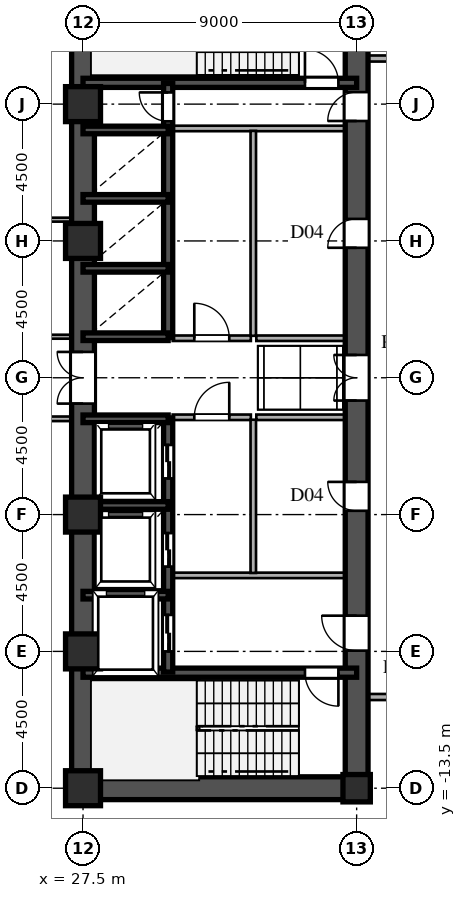
"""IFC4 building model, lengths in metres.
Left out: names, types, materials, properties, quantities, classifications, styles, units other than length and angle.
Written with IfcOpenShell. Run it as: python <this file> out.ifc"""

import sys

from ifc_helpers import new_model, si_unit, direction, frame, frame_2d, origin, origin_2d, place, context, subcontext, project, spatial, rectangle, hollow_rectangle, i_section, extrude, source, transform, mapped, element, fill, save


model = new_model("IFC4")
c1 = context("Model", 3, precision=1e-05, world=origin(), true_north=direction((0.0, 1.0)))
c2 = subcontext(c1, "Body", "Model", "MODEL_VIEW")
j1 = project(units=[si_unit("LENGTHUNIT", "METRE"), si_unit("PLANEANGLEUNIT", "RADIAN")], contexts=[c1])
p1 = place(None, origin())
s1 = spatial("IfcSite", under=j1, at=p1, CompositionType="ELEMENT")
p2 = place(p1, origin())
s2 = spatial("IfcBuilding", under=s1, at=p2, CompositionType="ELEMENT")
p3 = place(p2, frame((0.0, 0.0, 5.4)))
s3 = spatial("IfcBuildingStorey", under=s2, at=p3, CompositionType="ELEMENT", Elevation=5.4)
m1 = source(origin(), c2, "Body", "SweptSolid", [
    extrude(hollow_rectangle(XDim=1.15, YDim=1.15, WallThickness=0.048, at=origin_2d()), origin(), (0.0, 0.0, 1.0), 4.5),
])
for number, where, z_axis, x_axis in (
    (1, (27.5, -13.5, 0.0), (0.0, 0.0, 1.0), (1.0, 0.0, 0.0)),
    (2, (27.5, -9.0, 0.0), (0.0, 0.0, 1.0), (1.0, 0.0, 0.0)),
    (3, (27.5, -4.5, 0.0), (0.0, 0.0, 1.0), (1.0, 0.0, 0.0)),
    (4, (27.5, 4.5, 0.0), (0.0, 0.0, 1.0), (1.0, 0.0, 0.0)),
    (5, (27.5, 9.0, 0.0), (0.0, 0.0, 1.0), (1.0, 0.0, 0.0)),
):
    element("IfcColumn", number, at=place(p3, frame(where, z_axis=z_axis, x_axis=x_axis)), inside=s3, PredefinedType="COLUMN", context=c2, shape_type="MappedRepresentation", body=[
        mapped(m1, transform((0.0, 0.0, 0.0), scale=1.0)),
    ])
m2 = source(origin(), c2, "Body", "SweptSolid", [
    extrude(i_section(OverallWidth=0.9, OverallDepth=0.9, WebThickness=0.036, FlangeThickness=0.055, at=origin_2d()), origin(), (0.0, 0.0, 1.0), 4.5),
])
p4 = place(p3, frame((36.5, -13.5, 0.0), z_axis=(0.0, 0.0, 1.0), x_axis=(1.0, 0.0, 0.0)))
e6 = element("IfcColumn", 6, at=p4, inside=s3, PredefinedType="COLUMN", context=c2, shape_type="MappedRepresentation", body=[
    mapped(m2, transform((0.0, 0.0, 0.0), scale=1.0)),
])
for number, where, z_axis, x_axis in (
    (7, (27.5, -13.5, 0.0), (0.0, 0.0, 1.0), (0.0, 1.0, 0.0)),
    (8, (27.5, 1.3, 0.0), (0.0, 0.0, 1.0), (0.0, 1.0, 0.0)),
):
    element("IfcWall", number, at=place(p3, frame(where, z_axis=z_axis, x_axis=x_axis)), inside=s3, PredefinedType="SHEAR", context=c2, shape_type="SweptSolid", body=[
        extrude(rectangle(XDim=12.2, YDim=0.75, at=frame_2d((6.1, 0.0))), origin(), (0.0, 0.0, 1.0), 4.22),
    ])
p5 = place(p3, frame((27.5, -1.3, 0.0), z_axis=(0.0, 0.0, 1.0), x_axis=(0.0, 1.0, 0.0)))
e9 = element("IfcWall", 9, at=p5, inside=s3, PredefinedType="SHEAR", context=c2, shape_type="SweptSolid", body=[
    extrude(rectangle(XDim=2.6, YDim=0.75, at=frame_2d((1.3, 0.0))), origin(), (0.0, 0.0, 1.0), 4.22),
])
p6 = place(p5, frame((0.45, 0.0, 0.0)))
e10 = element("IfcOpeningElement", 10, at=p6, cuts=e9, PredefinedType="OPENING", context=c2, shape_type="SweptSolid", body=[
    extrude(rectangle(XDim=1.7, YDim=2.35, at=frame_2d((0.85, 1.175))), frame((0.0, 0.385, 0.0), z_axis=(0.0, -1.0, 0.0), x_axis=(1.0, 0.0, 0.0)), (0.0, 0.0, 1.0), 0.77),
])
p7 = place(p3, frame((27.5, -13.5, 0.0), z_axis=(0.0, 0.0, 1.0), x_axis=(1.0, 0.0, 0.0)))
e11 = element("IfcWall", 11, at=p7, inside=s3, PredefinedType="SHEAR", context=c2, shape_type="SweptSolid", body=[
    extrude(rectangle(XDim=9.0, YDim=0.75, at=frame_2d((4.5, 0.0))), origin(), (0.0, 0.0, 1.0), 4.22),
])
p8 = place(p3, frame((36.5, -13.65, 0.0), z_axis=(0.0, 0.0, 1.0), x_axis=(0.0, 1.0, 0.0)))
e12 = element("IfcWall", 12, at=p8, inside=s3, PredefinedType="SHEAR", context=c2, shape_type="SweptSolid", body=[
    extrude(rectangle(XDim=7.15, YDim=0.75, at=frame_2d((3.575, 0.0))), origin(), (0.0, 0.0, 1.0), 4.22),
])
p9 = place(p8, frame((4.675, 0.0, 0.0)))
e13 = element("IfcOpeningElement", 13, at=p9, cuts=e12, PredefinedType="OPENING", context=c2, shape_type="SweptSolid", body=[
    extrude(rectangle(XDim=1.15, YDim=2.2, at=frame_2d((0.575, 1.1))), frame((0.0, 0.385, 0.0), z_axis=(0.0, -1.0, 0.0), x_axis=(1.0, 0.0, 0.0)), (0.0, 0.0, 1.0), 0.77),
])
p10 = place(p3, frame((36.5, -1.3, 0.0), z_axis=(0.0, 0.0, 1.0), x_axis=(0.0, 1.0, 0.0)))
e14 = element("IfcWall", 14, at=p10, inside=s3, PredefinedType="SHEAR", context=c2, shape_type="SweptSolid", body=[
    extrude(rectangle(XDim=2.6, YDim=0.75, at=frame_2d((1.3, 0.0))), origin(), (0.0, 0.0, 1.0), 4.22),
])
p11 = place(p10, frame((0.55, 0.0, 0.0)))
e15 = element("IfcOpeningElement", 15, at=p11, cuts=e14, PredefinedType="OPENING", context=c2, shape_type="SweptSolid", body=[
    extrude(rectangle(XDim=1.5, YDim=2.3, at=frame_2d((0.75, 1.15))), frame((0.0, 0.385, 0.0), z_axis=(0.0, -1.0, 0.0), x_axis=(1.0, 0.0, 0.0)), (0.0, 0.0, 1.0), 0.77),
])
p12 = place(p3, frame((36.5, 8.2, 0.0), z_axis=(0.0, 0.0, 1.0), x_axis=(0.0, 1.0, 0.0)))
e16 = element("IfcWall", 16, at=p12, inside=s3, PredefinedType="SHEAR", context=c2, shape_type="SweptSolid", body=[
    extrude(rectangle(XDim=5.45, YDim=0.75, at=frame_2d((2.725, 0.0))), origin(), (0.0, 0.0, 1.0), 4.22),
])
p13 = place(p12, frame((0.245, 0.0, 0.0)))
e17 = element("IfcOpeningElement", 17, at=p13, cuts=e16, PredefinedType="OPENING", context=c2, shape_type="SweptSolid", body=[
    extrude(rectangle(XDim=0.95, YDim=2.15, at=frame_2d((0.475, 1.075))), frame((0.0, 0.385, 0.0), z_axis=(0.0, -1.0, 0.0), x_axis=(1.0, 0.0, 0.0)), (0.0, 0.0, 1.0), 0.77),
])
p14 = place(p3, frame((36.5, -6.5, 0.0), z_axis=(0.0, 0.0, 1.0), x_axis=(0.0, 1.0, 0.0)))
e18 = element("IfcWall", 18, at=p14, inside=s3, PredefinedType="SHEAR", context=c2, shape_type="SweptSolid", body=[
    extrude(rectangle(XDim=5.2, YDim=0.75, at=frame_2d((2.6, 0.0))), origin(), (0.0, 0.0, 1.0), 4.22),
])
p15 = place(p14, frame((2.125, 0.0, 0.0)))
e19 = element("IfcOpeningElement", 19, at=p15, cuts=e18, PredefinedType="OPENING", context=c2, shape_type="SweptSolid", body=[
    extrude(rectangle(XDim=0.95, YDim=2.15, at=frame_2d((0.475, 1.075))), frame((0.0, 0.385, 0.0), z_axis=(0.0, -1.0, 0.0), x_axis=(1.0, 0.0, 0.0)), (0.0, 0.0, 1.0), 0.77),
])
p16 = place(p3, frame((36.5, 1.3, 0.0), z_axis=(0.0, 0.0, 1.0), x_axis=(0.0, 1.0, 0.0)))
e20 = element("IfcWall", 20, at=p16, inside=s3, PredefinedType="SHEAR", context=c2, shape_type="SweptSolid", body=[
    extrude(rectangle(XDim=6.9, YDim=0.75, at=frame_2d((3.45, 0.0))), origin(), (0.0, 0.0, 1.0), 4.22),
])
p17 = place(p16, frame((2.975, 0.0, 0.0)))
e21 = element("IfcOpeningElement", 21, at=p17, cuts=e20, PredefinedType="OPENING", context=c2, shape_type="SweptSolid", body=[
    extrude(rectangle(XDim=0.95, YDim=2.15, at=frame_2d((0.475, 1.075))), frame((0.0, 0.385, 0.0), z_axis=(0.0, -1.0, 0.0), x_axis=(1.0, 0.0, 0.0)), (0.0, 0.0, 1.0), 0.77),
])
p18 = place(p3, frame((27.5, -9.7, 0.0), z_axis=(0.0, 0.0, 1.0), x_axis=(1.0, 0.0, 0.0)))
e22 = element("IfcWall", 22, at=p18, inside=s3, PredefinedType="SHEAR", context=c2, shape_type="SweptSolid", body=[
    extrude(rectangle(XDim=9.0, YDim=0.3, at=frame_2d((4.5, 0.0))), origin(), (0.0, 0.0, 1.0), 4.22),
])
p19 = place(p18, frame((7.3, 0.0, 0.0)))
e23 = element("IfcOpeningElement", 23, at=p19, cuts=e22, PredefinedType="OPENING", context=c2, shape_type="SweptSolid", body=[
    extrude(rectangle(XDim=1.1, YDim=2.2, at=frame_2d((0.55, 1.1))), frame((0.0, 0.16, 0.0), z_axis=(0.0, -1.0, 0.0), x_axis=(1.0, 0.0, 0.0)), (0.0, 0.0, 1.0), 0.32),
])
p20 = place(p3, frame((27.5, 9.7, 0.0), z_axis=(0.0, 0.0, 1.0), x_axis=(1.0, 0.0, 0.0)))
e24 = element("IfcWall", 24, at=p20, inside=s3, PredefinedType="SHEAR", context=c2, shape_type="SweptSolid", body=[
    extrude(rectangle(XDim=9.0, YDim=0.3, at=frame_2d((4.5, 0.0))), origin(), (0.0, 0.0, 1.0), 4.22),
])
p21 = place(p20, frame((7.3, 0.0, 0.0)))
e25 = element("IfcOpeningElement", 25, at=p21, cuts=e24, PredefinedType="OPENING", context=c2, shape_type="SweptSolid", body=[
    extrude(rectangle(XDim=1.1, YDim=2.2, at=frame_2d((0.55, 1.1))), frame((0.0, 0.16, 0.0), z_axis=(0.0, -1.0, 0.0), x_axis=(1.0, 0.0, 0.0)), (0.0, 0.0, 1.0), 0.32),
])
for number, where, z_axis, x_axis in (
    (26, (27.5, -7.15, 0.0), (0.0, 0.0, 1.0), (1.0, 0.0, 0.0)),
    (27, (27.5, -4.2, 0.0), (0.0, 0.0, 1.0), (1.0, 0.0, 0.0)),
    (28, (27.5, -1.35, 0.0), (0.0, 0.0, 1.0), (1.0, 0.0, 0.0)),
    (29, (27.5, 1.35, 0.0), (0.0, 0.0, 1.0), (1.0, 0.0, 0.0)),
    (30, (27.5, 3.6, 0.0), (0.0, 0.0, 1.0), (1.0, 0.0, 0.0)),
    (31, (27.5, 5.9, 0.0), (0.0, 0.0, 1.0), (1.0, 0.0, 0.0)),
    (32, (27.5, 8.15, 0.0), (0.0, 0.0, 1.0), (1.0, 0.0, 0.0)),
):
    element("IfcWall", number, at=place(p3, frame(where, z_axis=z_axis, x_axis=x_axis)), inside=s3, PredefinedType="SHEAR", context=c2, shape_type="SweptSolid", body=[
        extrude(rectangle(XDim=2.8, YDim=0.25, at=frame_2d((1.4, 0.0))), origin(), (0.0, 0.0, 1.0), 4.22),
    ])
p22 = place(p3, frame((30.3, -9.68, 0.0), z_axis=(0.0, 0.0, 1.0), x_axis=(0.0, 1.0, 0.0)))
e33 = element("IfcWall", 33, at=p22, inside=s3, PredefinedType="SHEAR", context=c2, shape_type="SweptSolid", body=[
    extrude(rectangle(XDim=2.56, YDim=0.3, at=frame_2d((1.28, 0.0))), origin(), (0.0, 0.0, 1.0), 4.22),
])
p23 = place(p22, frame((0.68, 0.0, 0.0)))
e34 = element("IfcOpeningElement", 34, at=p23, cuts=e33, PredefinedType="OPENING", context=c2, shape_type="SweptSolid", body=[
    extrude(rectangle(XDim=1.2, YDim=2.25, at=frame_2d((0.6, 1.125))), frame((0.0, 0.16, 0.0), z_axis=(0.0, -1.0, 0.0), x_axis=(1.0, 0.0, 0.0)), (0.0, 0.0, 1.0), 0.32),
])
p24 = place(p3, frame((30.3, -7.12, 0.0), z_axis=(0.0, 0.0, 1.0), x_axis=(0.0, 1.0, 0.0)))
e35 = element("IfcWall", 35, at=p24, inside=s3, PredefinedType="SHEAR", context=c2, shape_type="SweptSolid", body=[
    extrude(rectangle(XDim=2.92, YDim=0.3, at=frame_2d((1.46, 0.0))), origin(), (0.0, 0.0, 1.0), 4.22),
])
p25 = place(p24, frame((0.91, 0.0, 0.0)))
e36 = element("IfcOpeningElement", 36, at=p25, cuts=e35, PredefinedType="OPENING", context=c2, shape_type="SweptSolid", body=[
    extrude(rectangle(XDim=1.1, YDim=2.2, at=frame_2d((0.55, 1.1))), frame((0.0, 0.16, 0.0), z_axis=(0.0, -1.0, 0.0), x_axis=(1.0, 0.0, 0.0)), (0.0, 0.0, 1.0), 0.32),
])
p26 = place(p3, frame((30.3, -4.2, 0.0), z_axis=(0.0, 0.0, 1.0), x_axis=(0.0, 1.0, 0.0)))
e37 = element("IfcWall", 37, at=p26, inside=s3, PredefinedType="SHEAR", context=c2, shape_type="SweptSolid", body=[
    extrude(rectangle(XDim=2.88, YDim=0.3, at=frame_2d((1.44, 0.0))), origin(), (0.0, 0.0, 1.0), 4.22),
])
p27 = place(p26, frame((0.89, 0.0, 0.0)))
e38 = element("IfcOpeningElement", 38, at=p27, cuts=e37, PredefinedType="OPENING", context=c2, shape_type="SweptSolid", body=[
    extrude(rectangle(XDim=1.1, YDim=2.2, at=frame_2d((0.55, 1.1))), frame((0.0, 0.16, 0.0), z_axis=(0.0, -1.0, 0.0), x_axis=(1.0, 0.0, 0.0)), (0.0, 0.0, 1.0), 0.32),
])
p28 = place(p3, frame((30.3, 1.32, 0.0), z_axis=(0.0, 0.0, 1.0), x_axis=(0.0, 1.0, 0.0)))
e39 = element("IfcWall", 39, at=p28, inside=s3, PredefinedType="SHEAR", context=c2, shape_type="SweptSolid", body=[
    extrude(rectangle(XDim=2.28, YDim=0.3, at=frame_2d((1.14, 0.0))), origin(), (0.0, 0.0, 1.0), 4.22),
])
p29 = place(p3, frame((30.3, 3.6, 0.0), z_axis=(0.0, 0.0, 1.0), x_axis=(0.0, 1.0, 0.0)))
e40 = element("IfcWall", 40, at=p29, inside=s3, PredefinedType="SHEAR", context=c2, shape_type="SweptSolid", body=[
    extrude(rectangle(XDim=2.3, YDim=0.3, at=frame_2d((1.15, 0.0))), origin(), (0.0, 0.0, 1.0), 4.22),
])
p30 = place(p3, frame((30.3, 5.9, 0.0), z_axis=(0.0, 0.0, 1.0), x_axis=(0.0, 1.0, 0.0)))
e41 = element("IfcWall", 41, at=p30, inside=s3, PredefinedType="SHEAR", context=c2, shape_type="SweptSolid", body=[
    extrude(rectangle(XDim=2.25, YDim=0.3, at=frame_2d((1.125, 0.0))), origin(), (0.0, 0.0, 1.0), 4.22),
])
p31 = place(p3, frame((30.3, 8.15, 0.0), z_axis=(0.0, 0.0, 1.0), x_axis=(0.0, 1.0, 0.0)))
e42 = element("IfcWall", 42, at=p31, inside=s3, PredefinedType="SHEAR", context=c2, shape_type="SweptSolid", body=[
    extrude(rectangle(XDim=1.53, YDim=0.3, at=frame_2d((0.765, 0.0))), origin(), (0.0, 0.0, 1.0), 4.22),
])
p32 = place(p31, frame((0.285, 0.0, 0.0)))
e43 = element("IfcOpeningElement", 43, at=p32, cuts=e42, PredefinedType="OPENING", context=c2, shape_type="SweptSolid", body=[
    extrude(rectangle(XDim=0.95, YDim=2.15, at=frame_2d((0.475, 1.075))), frame((0.0, 0.16, 0.0), z_axis=(0.0, -1.0, 0.0), x_axis=(1.0, 0.0, 0.0)), (0.0, 0.0, 1.0), 0.32),
])
for number, where, z_axis, x_axis in (
    (44, (30.45, -6.5, 0.0), (0.0, 0.0, 1.0), (1.0, 0.0, 0.0)),
    (45, (30.45, 8.2, 0.0), (0.0, 0.0, 1.0), (1.0, 0.0, 0.0)),
):
    element("IfcWall", number, at=place(p3, frame(where, z_axis=z_axis, x_axis=x_axis)), inside=s3, PredefinedType="PARTITIONING", context=c2, shape_type="SweptSolid", body=[
        extrude(rectangle(XDim=5.7, YDim=0.18, at=frame_2d((2.85, 0.0))), origin(), (0.0, 0.0, 1.0), 4.22),
    ])
p33 = place(p3, frame((33.1, -6.42, 0.0), z_axis=(0.0, 0.0, 1.0), x_axis=(0.0, 1.0, 0.0)))
e46 = element("IfcWall", 46, at=p33, inside=s3, PredefinedType="PARTITIONING", context=c2, shape_type="SweptSolid", body=[
    extrude(rectangle(XDim=5.04, YDim=0.18, at=frame_2d((2.52, 0.0))), origin(), (0.0, 0.0, 1.0), 4.22),
])
p34 = place(p3, frame((33.1, 1.38, 0.0), z_axis=(0.0, 0.0, 1.0), x_axis=(0.0, 1.0, 0.0)))
e47 = element("IfcWall", 47, at=p34, inside=s3, PredefinedType="PARTITIONING", context=c2, shape_type="SweptSolid", body=[
    extrude(rectangle(XDim=6.74, YDim=0.18, at=frame_2d((3.37, 0.0))), origin(), (0.0, 0.0, 1.0), 4.22),
])
p35 = place(p3, frame((30.45, -1.3, 0.0), z_axis=(0.0, 0.0, 1.0), x_axis=(1.0, 0.0, 0.0)))
e48 = element("IfcWall", 48, at=p35, inside=s3, PredefinedType="PARTITIONING", context=c2, shape_type="SweptSolid", body=[
    extrude(rectangle(XDim=2.57, YDim=0.18, at=frame_2d((1.285, 0.0))), origin(), (0.0, 0.0, 1.0), 4.22),
])
p36 = place(p35, frame((0.71, 0.0, 0.0)))
e49 = element("IfcOpeningElement", 49, at=p36, cuts=e48, PredefinedType="OPENING", context=c2, shape_type="SweptSolid", body=[
    extrude(rectangle(XDim=1.15, YDim=2.2, at=frame_2d((0.575, 1.1))), frame((0.0, 0.1, 0.0), z_axis=(0.0, -1.0, 0.0), x_axis=(1.0, 0.0, 0.0)), (0.0, 0.0, 1.0), 0.2),
])
p37 = place(p3, frame((30.45, 1.3, 0.0), z_axis=(0.0, 0.0, 1.0), x_axis=(1.0, 0.0, 0.0)))
e50 = element("IfcWall", 50, at=p37, inside=s3, PredefinedType="PARTITIONING", context=c2, shape_type="SweptSolid", body=[
    extrude(rectangle(XDim=2.57, YDim=0.18, at=frame_2d((1.285, 0.0))), origin(), (0.0, 0.0, 1.0), 4.22),
])
p38 = place(p37, frame((0.71, 0.0, 0.0)))
e51 = element("IfcOpeningElement", 51, at=p38, cuts=e50, PredefinedType="OPENING", context=c2, shape_type="SweptSolid", body=[
    extrude(rectangle(XDim=1.15, YDim=2.2, at=frame_2d((0.575, 1.1))), frame((0.0, 0.1, 0.0), z_axis=(0.0, -1.0, 0.0), x_axis=(1.0, 0.0, 0.0)), (0.0, 0.0, 1.0), 0.2),
])
for number, where, z_axis, x_axis in (
    (52, (33.2, -1.3, 0.0), (0.0, 0.0, 1.0), (1.0, 0.0, 0.0)),
    (53, (33.2, 1.3, 0.0), (0.0, 0.0, 1.0), (1.0, 0.0, 0.0)),
):
    element("IfcWall", number, at=place(p3, frame(where, z_axis=z_axis, x_axis=x_axis)), inside=s3, PredefinedType="PARTITIONING", context=c2, shape_type="SweptSolid", body=[
        extrude(rectangle(XDim=2.95, YDim=0.18, at=frame_2d((1.475, 0.0))), origin(), (0.0, 0.0, 1.0), 4.22),
    ])
p39 = place(p3, frame((36.88, -10.5, 0.0), z_axis=(0.0, 0.0, 1.0), x_axis=(1.0, 0.0, 0.0)))
e54 = element("IfcWall", 54, at=p39, inside=s3, PredefinedType="PARTITIONING", context=c2, shape_type="SweptSolid", body=[
    extrude(rectangle(XDim=2.035, YDim=0.2, at=frame_2d((1.018, 0.0))), origin(), (0.0, 0.0, 1.0), 4.22),
])
p40 = place(p3, frame((13.485, -1.35, 0.0), z_axis=(0.0, 0.0, 1.0), x_axis=(1.0, 0.0, 0.0)))
e55 = element("IfcWall", 55, at=p40, inside=s3, PredefinedType="PARTITIONING", context=c2, shape_type="SweptSolid", body=[
    extrude(rectangle(XDim=13.635, YDim=0.15, at=frame_2d((6.817, 0.0))), origin(), (0.0, 0.0, 1.0), 4.22),
])
p41 = place(p3, frame((13.485, 1.35, 0.0), z_axis=(0.0, 0.0, 1.0), x_axis=(1.0, 0.0, 0.0)))
e56 = element("IfcWall", 56, at=p41, inside=s3, PredefinedType="PARTITIONING", context=c2, shape_type="SweptSolid", body=[
    extrude(rectangle(XDim=13.635, YDim=0.13, at=frame_2d((6.817, 0.0))), origin(), (0.0, 0.0, 1.0), 4.22),
])
p42 = place(p41, frame((6.825, 0.0, 0.0)))
e57 = element("IfcOpeningElement", 57, at=p42, cuts=e56, PredefinedType="OPENING", context=c2, shape_type="SweptSolid", body=[
    extrude(rectangle(XDim=0.88, YDim=2.1, at=frame_2d((0.44, 1.05))), frame((0.0, 0.075, 0.0), z_axis=(0.0, -1.0, 0.0), x_axis=(1.0, 0.0, 0.0)), (0.0, 0.0, 1.0), 0.15),
])
p43 = place(p41, frame((11.175, 0.0, 0.0)))
e58 = element("IfcOpeningElement", 58, at=p43, cuts=e56, PredefinedType="OPENING", context=c2, shape_type="SweptSolid", body=[
    extrude(rectangle(XDim=0.88, YDim=2.1, at=frame_2d((0.44, 1.05))), frame((0.0, 0.075, 0.0), z_axis=(0.0, -1.0, 0.0), x_axis=(1.0, 0.0, 0.0)), (0.0, 0.0, 1.0), 0.15),
])
p44 = place(p3, frame((18.585, 5.2, 0.0), z_axis=(0.0, 0.0, 1.0), x_axis=(1.0, 0.0, 0.0)))
e59 = element("IfcWall", 59, at=p44, inside=s3, PredefinedType="PARTITIONING", context=c2, shape_type="SweptSolid", body=[
    extrude(rectangle(XDim=8.535, YDim=0.13, at=frame_2d((4.268, 0.0))), origin(), (0.0, 0.0, 1.0), 4.22),
])
p45 = place(p3, frame((36.88, 10.5, 0.0), z_axis=(0.0, 0.0, 1.0), x_axis=(1.0, 0.0, 0.0)))
e60 = element("IfcWall", 60, at=p45, inside=s3, PredefinedType="PARTITIONING", context=c2, shape_type="SweptSolid", body=[
    extrude(rectangle(XDim=2.035, YDim=0.2, at=frame_2d((1.018, 0.0))), origin(), (0.0, 0.0, 1.0), 4.22),
])
m3 = source(origin(), c2, "Body", "SweptSolid", [
    extrude(rectangle(XDim=1.7, YDim=2.35, at=frame_2d((0.85, 1.175))), frame((0.0, 0.025, 0.0), z_axis=(0.0, -1.0, 0.0), x_axis=(1.0, 0.0, 0.0)), (0.0, 0.0, 1.0), 0.05),
])
p46 = place(p6, origin())
e61 = element("IfcDoor", 61, at=p46, inside=s3, OperationType="DOUBLE_SWING_LEFT", PredefinedType="DOOR", context=c2, shape_type="MappedRepresentation", body=[
    mapped(m3, transform((0.0, 0.0, 0.0), scale=1.0)),
])
fill(e10, e61)
m4 = source(origin(), c2, "Body", "SweptSolid", [
    extrude(rectangle(XDim=1.15, YDim=2.2, at=frame_2d((0.575, 1.1))), frame((0.0, 0.025, 0.0), z_axis=(0.0, -1.0, 0.0), x_axis=(1.0, 0.0, 0.0)), (0.0, 0.0, 1.0), 0.05),
])
p47 = place(p9, origin())
e62 = element("IfcDoor", 62, at=p47, inside=s3, OperationType="SINGLE_SWING_RIGHT", PredefinedType="DOOR", context=c2, shape_type="MappedRepresentation", body=[
    mapped(m4, transform((0.0, 0.0, 0.0), scale=1.0)),
])
fill(e13, e62)
m5 = source(origin(), c2, "Body", "SweptSolid", [
    extrude(rectangle(XDim=1.5, YDim=2.3, at=frame_2d((0.75, 1.15))), frame((0.0, 0.025, 0.0), z_axis=(0.0, -1.0, 0.0), x_axis=(1.0, 0.0, 0.0)), (0.0, 0.0, 1.0), 0.05),
])
p48 = place(p11, origin())
e63 = element("IfcDoor", 63, at=p48, inside=s3, OperationType="DOUBLE_SWING_LEFT", PredefinedType="DOOR", context=c2, shape_type="MappedRepresentation", body=[
    mapped(m5, transform((0.0, 0.0, 0.0), scale=1.0)),
])
fill(e15, e63)
m6 = source(origin(), c2, "Body", "SweptSolid", [
    extrude(rectangle(XDim=0.95, YDim=2.15, at=frame_2d((0.475, 1.075))), frame((0.0, 0.025, 0.0), z_axis=(0.0, -1.0, 0.0), x_axis=(1.0, 0.0, 0.0)), (0.0, 0.0, 1.0), 0.05),
])
p49 = place(p13, origin())
e64 = element("IfcDoor", 64, at=p49, inside=s3, OperationType="SINGLE_SWING_LEFT", PredefinedType="DOOR", context=c2, shape_type="MappedRepresentation", body=[
    mapped(m6, transform((0.0, 0.0, 0.0), scale=1.0)),
])
fill(e17, e64)
p50 = place(p15, origin())
e65 = element("IfcDoor", 65, at=p50, inside=s3, OperationType="SINGLE_SWING_RIGHT", PredefinedType="DOOR", context=c2, shape_type="MappedRepresentation", body=[
    mapped(m6, transform((0.0, 0.0, 0.0), scale=1.0)),
])
fill(e19, e65)
p51 = place(p17, origin())
e66 = element("IfcDoor", 66, at=p51, inside=s3, OperationType="SINGLE_SWING_LEFT", PredefinedType="DOOR", context=c2, shape_type="MappedRepresentation", body=[
    mapped(m6, transform((0.0, 0.0, 0.0), scale=1.0)),
])
fill(e21, e66)
m7 = source(origin(), c2, "Body", "SweptSolid", [
    extrude(rectangle(XDim=1.1, YDim=2.2, at=frame_2d((0.55, 1.1))), frame((0.0, 0.025, 0.0), z_axis=(0.0, -1.0, 0.0), x_axis=(1.0, 0.0, 0.0)), (0.0, 0.0, 1.0), 0.05),
])
p52 = place(p19, frame((1.1, 0.0, 0.0), z_axis=(0.0, 0.0, 1.0), x_axis=(-1.0, 0.0, 0.0)))
e67 = element("IfcDoor", 67, at=p52, inside=s3, OperationType="SINGLE_SWING_RIGHT", PredefinedType="DOOR", context=c2, shape_type="MappedRepresentation", body=[
    mapped(m7, transform((0.0, 0.0, 0.0), scale=1.0)),
])
fill(e23, e67)
p53 = place(p21, origin())
e68 = element("IfcDoor", 68, at=p53, inside=s3, OperationType="SINGLE_SWING_LEFT", PredefinedType="DOOR", context=c2, shape_type="MappedRepresentation", body=[
    mapped(m7, transform((0.0, 0.0, 0.0), scale=1.0)),
])
fill(e25, e68)
m8 = source(origin(), c2, "Body", "SweptSolid", [
    extrude(rectangle(XDim=1.2, YDim=2.25, at=frame_2d((0.6, 1.125))), frame((0.0, 0.025, 0.0), z_axis=(0.0, -1.0, 0.0), x_axis=(1.0, 0.0, 0.0)), (0.0, 0.0, 1.0), 0.05),
])
p54 = place(p23, origin())
e69 = element("IfcDoor", 69, at=p54, inside=s3, OperationType="DOUBLE_DOOR_SLIDING", PredefinedType="DOOR", context=c2, shape_type="MappedRepresentation", body=[
    mapped(m8, transform((0.0, 0.0, 0.0), scale=1.0)),
])
fill(e34, e69)
m9 = source(origin(), c2, "Body", "SweptSolid", [
    extrude(rectangle(XDim=1.1, YDim=2.2, at=frame_2d((0.55, 1.1))), frame((0.0, 0.025, 0.0), z_axis=(0.0, -1.0, 0.0), x_axis=(1.0, 0.0, 0.0)), (0.0, 0.0, 1.0), 0.05),
])
p55 = place(p25, origin())
e70 = element("IfcDoor", 70, at=p55, inside=s3, OperationType="DOUBLE_DOOR_SLIDING", PredefinedType="DOOR", context=c2, shape_type="MappedRepresentation", body=[
    mapped(m9, transform((0.0, 0.0, 0.0), scale=1.0)),
])
fill(e36, e70)
p56 = place(p27, origin())
e71 = element("IfcDoor", 71, at=p56, inside=s3, OperationType="DOUBLE_DOOR_SLIDING", PredefinedType="DOOR", context=c2, shape_type="MappedRepresentation", body=[
    mapped(m9, transform((0.0, 0.0, 0.0), scale=1.0)),
])
fill(e38, e71)
p57 = place(p32, origin())
e72 = element("IfcDoor", 72, at=p57, inside=s3, OperationType="SINGLE_SWING_RIGHT", PredefinedType="DOOR", context=c2, shape_type="MappedRepresentation", body=[
    mapped(m6, transform((0.0, 0.0, 0.0), scale=1.0)),
])
fill(e43, e72)
p58 = place(p36, origin())
e73 = element("IfcDoor", 73, at=p58, inside=s3, OperationType="SINGLE_SWING_RIGHT", PredefinedType="DOOR", context=c2, shape_type="MappedRepresentation", body=[
    mapped(m4, transform((0.0, 0.0, 0.0), scale=1.0)),
])
fill(e49, e73)
p59 = place(p38, origin())
e74 = element("IfcDoor", 74, at=p59, inside=s3, OperationType="SINGLE_SWING_LEFT", PredefinedType="DOOR", context=c2, shape_type="MappedRepresentation", body=[
    mapped(m4, transform((0.0, 0.0, 0.0), scale=1.0)),
])
fill(e51, e74)
save(model, sys.argv[1])
